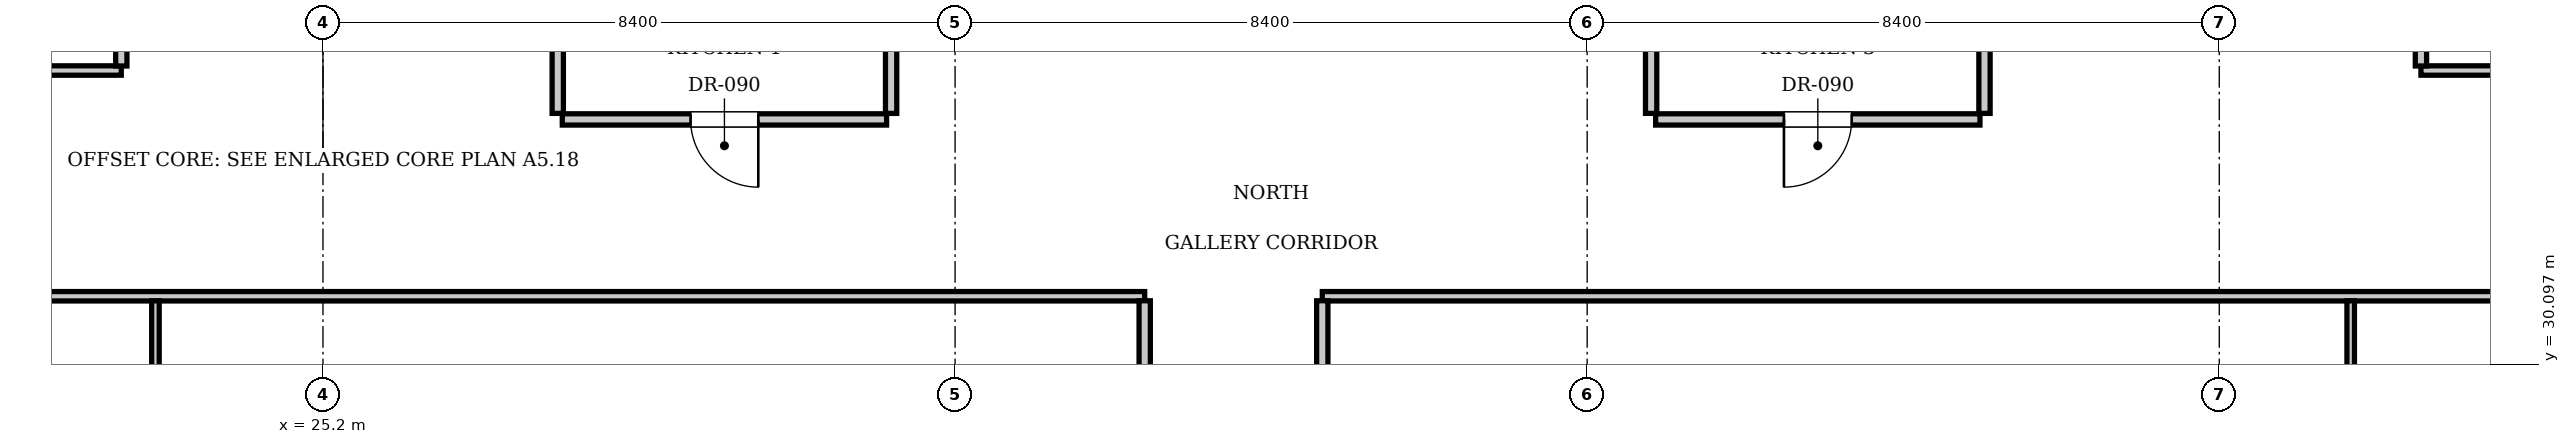
"""IFC4 building model, lengths in metres.
Left out: names, types, materials, properties, quantities, classifications, styles, units other than length and angle.
Written with IfcOpenShell. Run it as: python <this file> out.ifc"""

import sys

from ifc_helpers import new_model, si_unit, direction, frame, frame_2d, origin, place, context, subcontext, project, spatial, rectangle, extrude, element, fill, save


model = new_model("IFC4")
c1 = context("Model", 3, precision=1e-05, world=origin(), true_north=direction((0.0, 1.0)))
c2 = subcontext(c1, "Body", "Model", "MODEL_VIEW")
j1 = project(units=[si_unit("LENGTHUNIT", "METRE"), si_unit("PLANEANGLEUNIT", "RADIAN")], contexts=[c1])
p1 = place(None, origin())
s1 = spatial("IfcSite", under=j1, at=p1, CompositionType="ELEMENT")
p2 = place(p1, origin())
s2 = spatial("IfcBuilding", under=s1, at=p2, CompositionType="ELEMENT")
p3 = place(p2, frame((0.0, 0.0, 165.9)))
s3 = spatial("IfcBuildingStorey", under=s2, at=p3, CompositionType="ELEMENT", Elevation=165.9)
for number, where, z_axis, x_axis in (
    (1, (28.32, 33.43, 0.0), (0.0, 0.0, 1.0), (0.0, 1.0, 0.0)),
    (2, (32.75, 33.43, 0.0), (0.0, 0.0, 1.0), (0.0, 1.0, 0.0)),
):
    element("IfcWall", number, at=place(p3, frame(where, z_axis=z_axis, x_axis=x_axis)), inside=s3, PredefinedType="PARTITIONING", context=c2, shape_type="SweptSolid", body=[
        extrude(rectangle(XDim=2.69, YDim=0.15, at=frame_2d((1.345, 0.0))), origin(), (0.0, 0.0, 1.0), 3.61),
    ])
p4 = place(p3, frame((28.38, 33.35, 0.0), z_axis=(0.0, 0.0, 1.0), x_axis=(1.0, 0.0, 0.0)))
e3 = element("IfcWall", 3, at=p4, inside=s3, PredefinedType="PARTITIONING", context=c2, shape_type="SweptSolid", body=[
    extrude(rectangle(XDim=4.31, YDim=0.15, at=frame_2d((2.155, 0.0))), origin(), (0.0, 0.0, 1.0), 3.61),
])
p5 = place(p4, frame((1.705, 0.0, 0.0)))
e4 = element("IfcOpeningElement", 4, at=p5, cuts=e3, PredefinedType="OPENING", context=c2, shape_type="SweptSolid", body=[
    extrude(rectangle(XDim=0.9, YDim=2.1, at=frame_2d((0.45, 1.05))), frame((0.0, 0.085, 0.0), z_axis=(0.0, -1.0, 0.0), x_axis=(1.0, 0.0, 0.0)), (0.0, 0.0, 1.0), 0.17),
])
for number, where, z_axis, x_axis in (
    (5, (42.85, 33.43, 0.0), (0.0, 0.0, 1.0), (0.0, 1.0, 0.0)),
    (6, (47.28, 33.43, 0.0), (0.0, 0.0, 1.0), (0.0, 1.0, 0.0)),
):
    element("IfcWall", number, at=place(p3, frame(where, z_axis=z_axis, x_axis=x_axis)), inside=s3, PredefinedType="PARTITIONING", context=c2, shape_type="SweptSolid", body=[
        extrude(rectangle(XDim=2.69, YDim=0.15, at=frame_2d((1.345, 0.0))), origin(), (0.0, 0.0, 1.0), 3.61),
    ])
p6 = place(p3, frame((42.91, 33.35, 0.0), z_axis=(0.0, 0.0, 1.0), x_axis=(1.0, 0.0, 0.0)))
e7 = element("IfcWall", 7, at=p6, inside=s3, PredefinedType="PARTITIONING", context=c2, shape_type="SweptSolid", body=[
    extrude(rectangle(XDim=4.31, YDim=0.15, at=frame_2d((2.155, 0.0))), origin(), (0.0, 0.0, 1.0), 3.61),
])
p7 = place(p6, frame((1.705, 0.0, 0.0)))
e8 = element("IfcOpeningElement", 8, at=p7, cuts=e7, PredefinedType="OPENING", context=c2, shape_type="SweptSolid", body=[
    extrude(rectangle(XDim=0.9, YDim=2.1, at=frame_2d((0.45, 1.05))), frame((0.0, 0.085, 0.0), z_axis=(0.0, -1.0, 0.0), x_axis=(1.0, 0.0, 0.0)), (0.0, 0.0, 1.0), 0.17),
])
p8 = place(p3, frame((13.2, 31.0, 0.0), z_axis=(0.0, 0.0, 1.0), x_axis=(1.0, 0.0, 0.0)))
e9 = element("IfcWall", 9, at=p8, inside=s3, PredefinedType="PARTITIONING", context=c2, shape_type="SweptSolid", body=[
    extrude(rectangle(XDim=22.92, YDim=0.125, at=frame_2d((11.46, 0.0))), origin(), (0.0, 0.0, 1.0), 3.61),
])
p9 = place(p3, frame((38.48, 31.0, 0.0), z_axis=(0.0, 0.0, 1.0), x_axis=(1.0, 0.0, 0.0)))
e10 = element("IfcWall", 10, at=p9, inside=s3, PredefinedType="PARTITIONING", context=c2, shape_type="SweptSolid", body=[
    extrude(rectangle(XDim=23.92, YDim=0.125, at=frame_2d((11.96, 0.0))), origin(), (0.0, 0.0, 1.0), 3.61),
])
p10 = place(p3, frame((36.12, 26.7, 0.0), z_axis=(0.0, 0.0, 1.0), x_axis=(0.0, 1.0, 0.0)))
e11 = element("IfcWall", 11, at=p10, inside=s3, PredefinedType="PARTITIONING", context=c2, shape_type="SweptSolid", body=[
    extrude(rectangle(XDim=4.24, YDim=0.15, at=frame_2d((2.12, 0.0))), origin(), (0.0, 0.0, 1.0), 3.61),
])
p11 = place(p10, frame((1.645, 0.0, 0.0)))
e12 = element("IfcOpeningElement", 12, at=p11, cuts=e11, PredefinedType="OPENING", context=c2, shape_type="SweptSolid", body=[
    extrude(rectangle(XDim=0.95, YDim=2.15, at=frame_2d((0.475, 1.075))), frame((0.0, 0.085, 0.0), z_axis=(0.0, -1.0, 0.0), x_axis=(1.0, 0.0, 0.0)), (0.0, 0.0, 1.0), 0.17),
])
p12 = place(p3, frame((22.974, 24.41, 0.0), z_axis=(0.0, 0.0, 1.0), x_axis=(0.0, 1.0, 0.0)))
e13 = element("IfcWall", 13, at=p12, inside=s3, PredefinedType="PARTITIONING", context=c2, shape_type="SweptSolid", body=[
    extrude(rectangle(XDim=6.53, YDim=0.1, at=frame_2d((3.265, 0.0))), origin(), (0.0, 0.0, 1.0), 3.61),
])
p13 = place(p12, frame((3.895, 0.0, 0.0)))
e14 = element("IfcOpeningElement", 14, at=p13, cuts=e13, PredefinedType="OPENING", context=c2, shape_type="SweptSolid", body=[
    extrude(rectangle(XDim=0.9, YDim=2.1, at=frame_2d((0.45, 1.05))), frame((0.0, 0.06, 0.0), z_axis=(0.0, -1.0, 0.0), x_axis=(1.0, 0.0, 0.0)), (0.0, 0.0, 1.0), 0.12),
])
p14 = place(p3, frame((38.48, 26.7, 0.0), z_axis=(0.0, 0.0, 1.0), x_axis=(0.0, 1.0, 0.0)))
e15 = element("IfcWall", 15, at=p14, inside=s3, PredefinedType="PARTITIONING", context=c2, shape_type="SweptSolid", body=[
    extrude(rectangle(XDim=4.24, YDim=0.15, at=frame_2d((2.12, 0.0))), origin(), (0.0, 0.0, 1.0), 3.61),
])
p15 = place(p14, frame((1.645, 0.0, 0.0)))
e16 = element("IfcOpeningElement", 16, at=p15, cuts=e15, PredefinedType="OPENING", context=c2, shape_type="SweptSolid", body=[
    extrude(rectangle(XDim=0.95, YDim=2.15, at=frame_2d((0.475, 1.075))), frame((0.0, 0.085, 0.0), z_axis=(0.0, -1.0, 0.0), x_axis=(1.0, 0.0, 0.0)), (0.0, 0.0, 1.0), 0.17),
])
p16 = place(p3, frame((52.146, 24.41, 0.0), z_axis=(0.0, 0.0, 1.0), x_axis=(0.0, 1.0, 0.0)))
e17 = element("IfcWall", 17, at=p16, inside=s3, PredefinedType="PARTITIONING", context=c2, shape_type="SweptSolid", body=[
    extrude(rectangle(XDim=6.53, YDim=0.1, at=frame_2d((3.265, 0.0))), origin(), (0.0, 0.0, 1.0), 3.61),
])
p17 = place(p16, frame((3.895, 0.0, 0.0)))
e18 = element("IfcOpeningElement", 18, at=p17, cuts=e17, PredefinedType="OPENING", context=c2, shape_type="SweptSolid", body=[
    extrude(rectangle(XDim=0.9, YDim=2.1, at=frame_2d((0.45, 1.05))), frame((0.0, 0.06, 0.0), z_axis=(0.0, -1.0, 0.0), x_axis=(1.0, 0.0, 0.0)), (0.0, 0.0, 1.0), 0.12),
])
p18 = place(p3, frame((13.2, 34.0, 0.0), z_axis=(0.0, 0.0, 1.0), x_axis=(1.0, 0.0, 0.0)))
e19 = element("IfcWall", 19, at=p18, inside=s3, PredefinedType="PARTITIONING", context=c2, shape_type="SweptSolid", body=[
    extrude(rectangle(XDim=9.32, YDim=0.125, at=frame_2d((4.66, 0.0))), origin(), (0.0, 0.0, 1.0), 3.61),
])
p19 = place(p3, frame((53.08, 34.0, 0.0), z_axis=(0.0, 0.0, 1.0), x_axis=(1.0, 0.0, 0.0)))
e20 = element("IfcWall", 20, at=p19, inside=s3, PredefinedType="PARTITIONING", context=c2, shape_type="SweptSolid", body=[
    extrude(rectangle(XDim=9.32, YDim=0.125, at=frame_2d((4.66, 0.0))), origin(), (0.0, 0.0, 1.0), 3.61),
])
p20 = place(p3, frame((22.52, 34.06, 0.0), z_axis=(0.0, 0.0, 1.0), x_axis=(0.0, 1.0, 0.0)))
e21 = element("IfcWall", 21, at=p20, inside=s3, PredefinedType="PARTITIONING", context=c2, shape_type="SweptSolid", body=[
    extrude(rectangle(XDim=13.127, YDim=0.15, at=frame_2d((6.564, 0.0))), origin(), (0.0, 0.0, 1.0), 3.61),
])
p21 = place(p20, frame((6.089, 0.0, 0.0)))
e22 = element("IfcOpeningElement", 22, at=p21, cuts=e21, PredefinedType="OPENING", context=c2, shape_type="SweptSolid", body=[
    extrude(rectangle(XDim=0.95, YDim=2.15, at=frame_2d((0.475, 1.075))), frame((0.0, 0.085, 0.0), z_axis=(0.0, -1.0, 0.0), x_axis=(1.0, 0.0, 0.0)), (0.0, 0.0, 1.0), 0.17),
])
p22 = place(p3, frame((53.08, 34.06, 0.0), z_axis=(0.0, 0.0, 1.0), x_axis=(0.0, 1.0, 0.0)))
e23 = element("IfcWall", 23, at=p22, inside=s3, PredefinedType="PARTITIONING", context=c2, shape_type="SweptSolid", body=[
    extrude(rectangle(XDim=13.127, YDim=0.15, at=frame_2d((6.564, 0.0))), origin(), (0.0, 0.0, 1.0), 3.61),
])
p23 = place(p22, frame((6.089, 0.0, 0.0)))
e24 = element("IfcOpeningElement", 24, at=p23, cuts=e23, PredefinedType="OPENING", context=c2, shape_type="SweptSolid", body=[
    extrude(rectangle(XDim=0.95, YDim=2.15, at=frame_2d((0.475, 1.075))), frame((0.0, 0.085, 0.0), z_axis=(0.0, -1.0, 0.0), x_axis=(1.0, 0.0, 0.0)), (0.0, 0.0, 1.0), 0.17),
])
p24 = place(p5, frame((0.9, 0.0, 0.0), z_axis=(0.0, 0.0, 1.0), x_axis=(-1.0, 0.0, 0.0)))
e25 = element("IfcDoor", 25, at=p24, inside=s3, OperationType="SINGLE_SWING_LEFT", PredefinedType="DOOR", context=c2, shape_type="SweptSolid", body=[
    extrude(rectangle(XDim=0.9, YDim=2.1, at=frame_2d((0.45, 1.05))), frame((0.0, 0.025, 0.0), z_axis=(0.0, -1.0, 0.0), x_axis=(1.0, 0.0, 0.0)), (0.0, 0.0, 1.0), 0.05),
])
fill(e4, e25)
p25 = place(p7, frame((0.9, 0.0, 0.0), z_axis=(0.0, 0.0, 1.0), x_axis=(-1.0, 0.0, 0.0)))
e26 = element("IfcDoor", 26, at=p25, inside=s3, OperationType="SINGLE_SWING_RIGHT", PredefinedType="DOOR", context=c2, shape_type="SweptSolid", body=[
    extrude(rectangle(XDim=0.9, YDim=2.1, at=frame_2d((0.45, 1.05))), frame((0.0, 0.025, 0.0), z_axis=(0.0, -1.0, 0.0), x_axis=(1.0, 0.0, 0.0)), (0.0, 0.0, 1.0), 0.05),
])
fill(e8, e26)
save(model, sys.argv[1])
